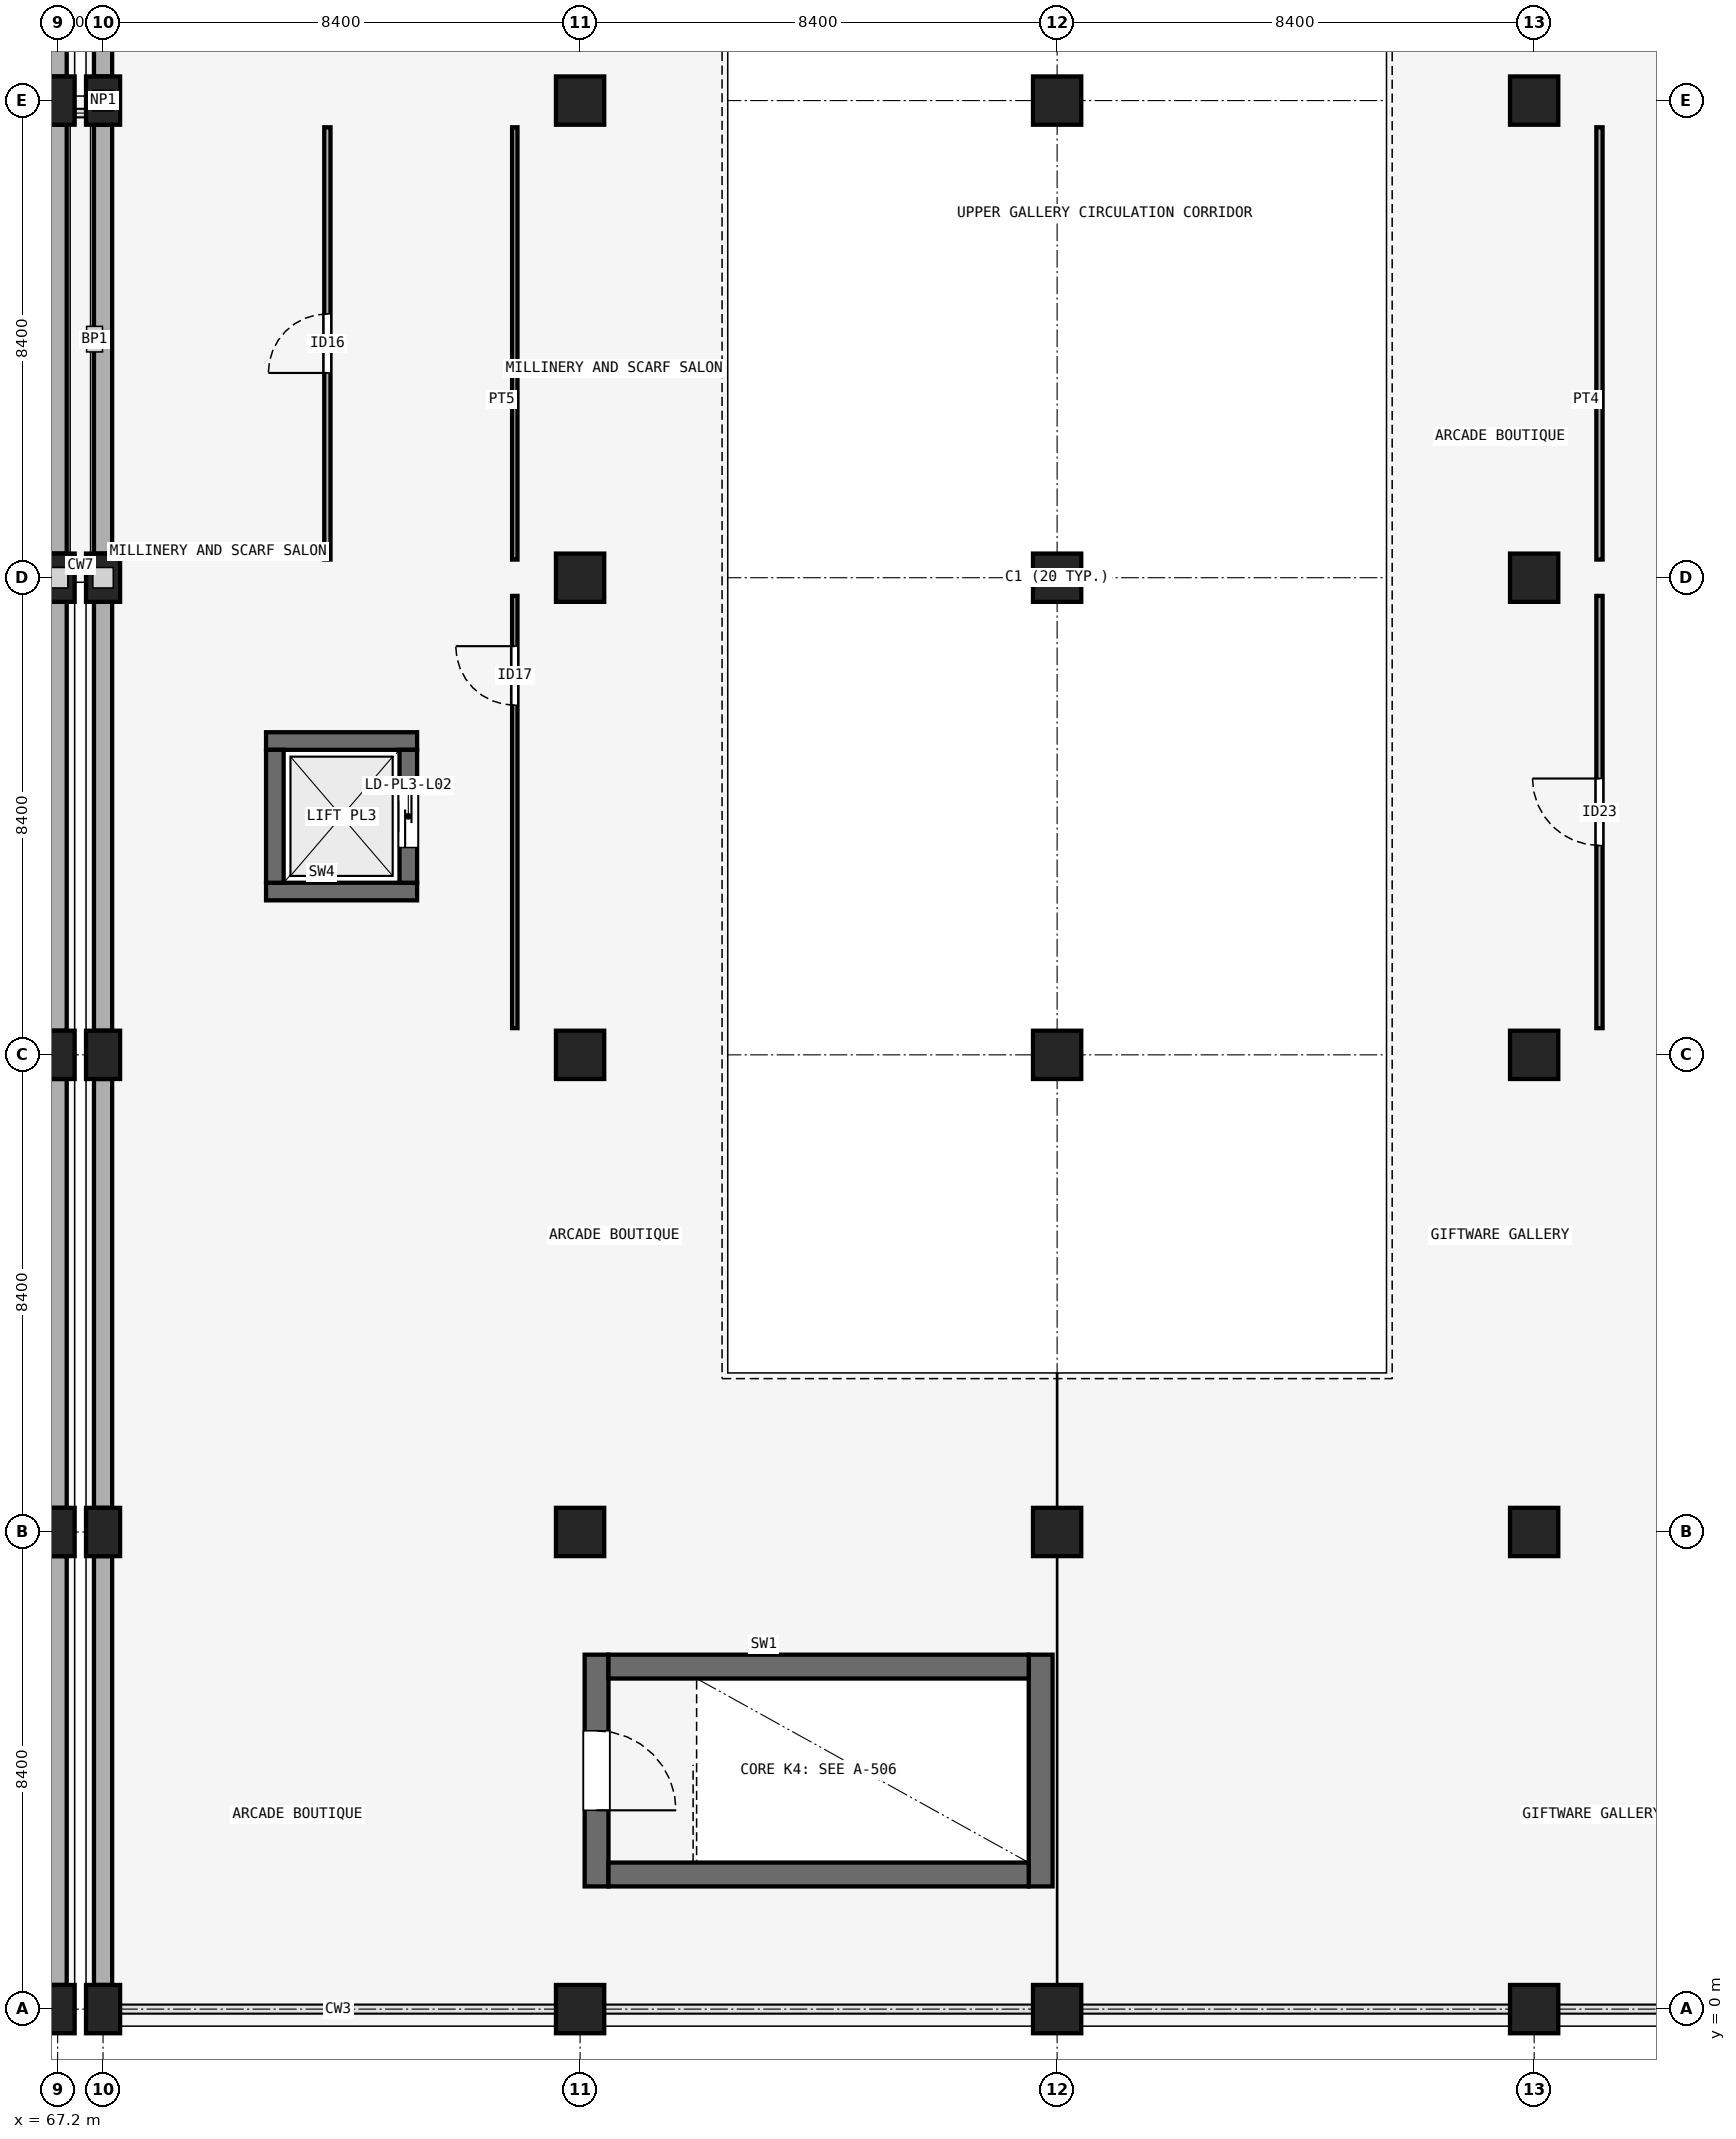
"""IFC4 building model, lengths in metres.
Left out: names, types, materials, properties, quantities, classifications, styles, units other than length and angle.
Written with IfcOpenShell. Run it as: python <this file> out.ifc"""

import sys

from ifc_helpers import new_model, si_unit, direction, frame, frame_2d, origin, origin_2d, place, context, subcontext, project, spatial, rectangle, extrude, element, fill, save


model = new_model("IFC4")
c1 = context("Model", 3, precision=1e-05, world=origin(), true_north=direction((0.0, 1.0)))
c2 = subcontext(c1, "Body", "Model", "MODEL_VIEW")
j1 = project(units=[si_unit("LENGTHUNIT", "METRE"), si_unit("PLANEANGLEUNIT", "RADIAN")], contexts=[c1])
p1 = place(None, origin())
s1 = spatial("IfcSite", under=j1, at=p1, CompositionType="ELEMENT")
p2 = place(p1, origin())
s2 = spatial("IfcBuilding", under=s1, at=p2, CompositionType="ELEMENT")
p3 = place(p2, frame((0.0, 0.0, 9.9)))
s3 = spatial("IfcBuildingStorey", under=s2, at=p3, CompositionType="ELEMENT", Elevation=9.9)
p4 = place(p3, frame((68.0, 0.0, 0.0), z_axis=(0.0, 0.0, 1.0), x_axis=(1.0, 0.0, 0.0)))
e1 = element("IfcColumn", 1, at=p4, inside=s3, PredefinedType="COLUMN", context=c2, shape_type="SweptSolid", body=[
    extrude(rectangle(XDim=0.6, YDim=0.85, at=origin_2d()), origin(), (0.0, 0.0, 1.0), 4.5),
])
for number, where, z_axis, x_axis in (
    (2, (76.4, 0.0, 0.0), (0.0, 0.0, 1.0), (1.0, 0.0, 0.0)),
    (3, (84.8, 0.0, 0.0), (0.0, 0.0, 1.0), (1.0, 0.0, 0.0)),
    (4, (93.2, 0.0, 0.0), (0.0, 0.0, 1.0), (1.0, 0.0, 0.0)),
):
    element("IfcColumn", number, at=place(p3, frame(where, z_axis=z_axis, x_axis=x_axis)), inside=s3, PredefinedType="COLUMN", context=c2, shape_type="SweptSolid", body=[
        extrude(rectangle(XDim=0.85, YDim=0.85, at=origin_2d()), origin(), (0.0, 0.0, 1.0), 4.5),
    ])
p5 = place(p3, frame((68.0, 8.4, 0.0), z_axis=(0.0, 0.0, 1.0), x_axis=(1.0, 0.0, 0.0)))
e5 = element("IfcColumn", 5, at=p5, inside=s3, PredefinedType="COLUMN", context=c2, shape_type="SweptSolid", body=[
    extrude(rectangle(XDim=0.6, YDim=0.85, at=origin_2d()), origin(), (0.0, 0.0, 1.0), 4.5),
])
for number, where, z_axis, x_axis in (
    (6, (76.4, 8.4, 0.0), (0.0, 0.0, 1.0), (1.0, 0.0, 0.0)),
    (7, (84.8, 8.4, 0.0), (0.0, 0.0, 1.0), (1.0, 0.0, 0.0)),
    (8, (93.2, 8.4, 0.0), (0.0, 0.0, 1.0), (1.0, 0.0, 0.0)),
):
    element("IfcColumn", number, at=place(p3, frame(where, z_axis=z_axis, x_axis=x_axis)), inside=s3, PredefinedType="COLUMN", context=c2, shape_type="SweptSolid", body=[
        extrude(rectangle(XDim=0.85, YDim=0.85, at=origin_2d()), origin(), (0.0, 0.0, 1.0), 4.5),
    ])
p6 = place(p3, frame((68.0, 16.8, 0.0), z_axis=(0.0, 0.0, 1.0), x_axis=(1.0, 0.0, 0.0)))
e9 = element("IfcColumn", 9, at=p6, inside=s3, PredefinedType="COLUMN", context=c2, shape_type="SweptSolid", body=[
    extrude(rectangle(XDim=0.6, YDim=0.85, at=origin_2d()), origin(), (0.0, 0.0, 1.0), 4.5),
])
for number, where, z_axis, x_axis in (
    (10, (76.4, 16.8, 0.0), (0.0, 0.0, 1.0), (1.0, 0.0, 0.0)),
    (11, (84.8, 16.8, 0.0), (0.0, 0.0, 1.0), (1.0, 0.0, 0.0)),
    (12, (93.2, 16.8, 0.0), (0.0, 0.0, 1.0), (1.0, 0.0, 0.0)),
):
    element("IfcColumn", number, at=place(p3, frame(where, z_axis=z_axis, x_axis=x_axis)), inside=s3, PredefinedType="COLUMN", context=c2, shape_type="SweptSolid", body=[
        extrude(rectangle(XDim=0.85, YDim=0.85, at=origin_2d()), origin(), (0.0, 0.0, 1.0), 4.5),
    ])
p7 = place(p3, frame((68.0, 25.2, 0.0), z_axis=(0.0, 0.0, 1.0), x_axis=(1.0, 0.0, 0.0)))
e13 = element("IfcColumn", 13, at=p7, inside=s3, PredefinedType="COLUMN", context=c2, shape_type="SweptSolid", body=[
    extrude(rectangle(XDim=0.6, YDim=0.85, at=origin_2d()), origin(), (0.0, 0.0, 1.0), 4.5),
])
for number, where, z_axis, x_axis in (
    (14, (76.4, 25.2, 0.0), (0.0, 0.0, 1.0), (1.0, 0.0, 0.0)),
    (15, (84.8, 25.2, 0.0), (0.0, 0.0, 1.0), (1.0, 0.0, 0.0)),
    (16, (93.2, 25.2, 0.0), (0.0, 0.0, 1.0), (1.0, 0.0, 0.0)),
):
    element("IfcColumn", number, at=place(p3, frame(where, z_axis=z_axis, x_axis=x_axis)), inside=s3, PredefinedType="COLUMN", context=c2, shape_type="SweptSolid", body=[
        extrude(rectangle(XDim=0.85, YDim=0.85, at=origin_2d()), origin(), (0.0, 0.0, 1.0), 4.5),
    ])
p8 = place(p3, frame((68.0, 33.6, 0.0), z_axis=(0.0, 0.0, 1.0), x_axis=(1.0, 0.0, 0.0)))
e17 = element("IfcColumn", 17, at=p8, inside=s3, PredefinedType="COLUMN", context=c2, shape_type="SweptSolid", body=[
    extrude(rectangle(XDim=0.6, YDim=0.85, at=origin_2d()), origin(), (0.0, 0.0, 1.0), 4.5),
])
for number, where, z_axis, x_axis in (
    (18, (76.4, 33.6, 0.0), (0.0, 0.0, 1.0), (1.0, 0.0, 0.0)),
    (19, (84.8, 33.6, 0.0), (0.0, 0.0, 1.0), (1.0, 0.0, 0.0)),
    (20, (93.2, 33.6, 0.0), (0.0, 0.0, 1.0), (1.0, 0.0, 0.0)),
):
    element("IfcColumn", number, at=place(p3, frame(where, z_axis=z_axis, x_axis=x_axis)), inside=s3, PredefinedType="COLUMN", context=c2, shape_type="SweptSolid", body=[
        extrude(rectangle(XDim=0.85, YDim=0.85, at=origin_2d()), origin(), (0.0, 0.0, 1.0), 4.5),
    ])
for number, where, z_axis, x_axis in (
    (21, (67.2, 0.0, 0.0), (0.0, 0.0, 1.0), (1.0, 0.0, 0.0)),
    (22, (67.2, 8.4, 0.0), (0.0, 0.0, 1.0), (1.0, 0.0, 0.0)),
    (23, (67.2, 16.8, 0.0), (0.0, 0.0, 1.0), (1.0, 0.0, 0.0)),
    (24, (67.2, 25.2, 0.0), (0.0, 0.0, 1.0), (1.0, 0.0, 0.0)),
    (25, (67.2, 33.6, 0.0), (0.0, 0.0, 1.0), (1.0, 0.0, 0.0)),
):
    element("IfcColumn", number, at=place(p3, frame(where, z_axis=z_axis, x_axis=x_axis)), inside=s3, PredefinedType="COLUMN", context=c2, shape_type="SweptSolid", body=[
        extrude(rectangle(XDim=0.6, YDim=0.85, at=origin_2d()), origin(), (0.0, 0.0, 1.0), 4.5),
    ])
for number, where, z_axis, x_axis in (
    (26, (68.0, 0.425, 0.0), (0.0, 0.0, 1.0), (0.0, 1.0, 0.0)),
    (27, (68.0, 8.825, 0.0), (0.0, 0.0, 1.0), (0.0, 1.0, 0.0)),
):
    element("IfcWall", number, at=place(p3, frame(where, z_axis=z_axis, x_axis=x_axis)), inside=s3, PredefinedType="SOLIDWALL", context=c2, shape_type="SweptSolid", body=[
        extrude(rectangle(XDim=7.55, YDim=0.32, at=frame_2d((3.775, 0.0))), origin(), (0.0, 0.0, 1.0), 3.49),
    ])
p9 = place(p3, frame((68.0, 17.225, 0.0), z_axis=(0.0, 0.0, 1.0), x_axis=(0.0, 1.0, 0.0)))
e28 = element("IfcWall", 28, at=p9, inside=s3, PredefinedType="SOLIDWALL", context=c2, shape_type="SweptSolid", body=[
    extrude(rectangle(XDim=7.55, YDim=0.32, at=frame_2d((3.775, 0.0))), origin(), (0.0, 0.0, 1.0), 3.49),
])
for number, where, z_axis, x_axis in (
    (29, (68.0, 25.625, 0.0), (0.0, 0.0, 1.0), (0.0, 1.0, 0.0)),
    (30, (68.0, 34.025, 0.0), (0.0, 0.0, 1.0), (0.0, 1.0, 0.0)),
    (31, (67.2, 0.425, 0.0), (0.0, 0.0, 1.0), (0.0, 1.0, 0.0)),
    (32, (67.2, 8.825, 0.0), (0.0, 0.0, 1.0), (0.0, 1.0, 0.0)),
):
    element("IfcWall", number, at=place(p3, frame(where, z_axis=z_axis, x_axis=x_axis)), inside=s3, PredefinedType="SOLIDWALL", context=c2, shape_type="SweptSolid", body=[
        extrude(rectangle(XDim=7.55, YDim=0.32, at=frame_2d((3.775, 0.0))), origin(), (0.0, 0.0, 1.0), 3.49),
    ])
p10 = place(p3, frame((67.2, 17.225, 0.0), z_axis=(0.0, 0.0, 1.0), x_axis=(0.0, 1.0, 0.0)))
e33 = element("IfcWall", 33, at=p10, inside=s3, PredefinedType="SOLIDWALL", context=c2, shape_type="SweptSolid", body=[
    extrude(rectangle(XDim=7.55, YDim=0.32, at=frame_2d((3.775, 0.0))), origin(), (0.0, 0.0, 1.0), 3.49),
])
for number, where, z_axis, x_axis in (
    (34, (67.2, 25.625, 0.0), (0.0, 0.0, 1.0), (0.0, 1.0, 0.0)),
    (35, (67.2, 34.025, 0.0), (0.0, 0.0, 1.0), (0.0, 1.0, 0.0)),
):
    element("IfcWall", number, at=place(p3, frame(where, z_axis=z_axis, x_axis=x_axis)), inside=s3, PredefinedType="SOLIDWALL", context=c2, shape_type="SweptSolid", body=[
        extrude(rectangle(XDim=7.55, YDim=0.32, at=frame_2d((3.775, 0.0))), origin(), (0.0, 0.0, 1.0), 3.49),
    ])
p11 = place(p3, frame((76.69, 6.24, 0.0), z_axis=(0.0, 0.0, 1.0), x_axis=(0.0, -1.0, 0.0)))
e36 = element("IfcWall", 36, at=p11, inside=s3, PredefinedType="SHEAR", context=c2, shape_type="SweptSolid", body=[
    extrude(rectangle(XDim=4.08, YDim=0.42, at=frame_2d((2.04, 0.0))), origin(), (0.0, 0.0, 1.0), 4.24),
])
p12 = place(p11, frame((1.34, 0.0, 0.0)))
e37 = element("IfcOpeningElement", 37, at=p12, cuts=e36, PredefinedType="OPENING", context=c2, shape_type="SweptSolid", body=[
    extrude(rectangle(XDim=1.4, YDim=2.15, at=frame_2d((0.7, 1.075))), frame((0.0, 0.22, 0.0), z_axis=(0.0, -1.0, 0.0), x_axis=(1.0, 0.0, 0.0)), (0.0, 0.0, 1.0), 0.44),
])
p13 = place(p3, frame((84.51, 2.16, 0.0), z_axis=(0.0, 0.0, 1.0), x_axis=(0.0, 1.0, 0.0)))
e38 = element("IfcWall", 38, at=p13, inside=s3, PredefinedType="SHEAR", context=c2, shape_type="SweptSolid", body=[
    extrude(rectangle(XDim=4.08, YDim=0.42, at=frame_2d((2.04, 0.0))), origin(), (0.0, 0.0, 1.0), 4.24),
])
for number, where, z_axis, x_axis in (
    (39, (76.9, 2.37, 0.0), (0.0, 0.0, 1.0), (1.0, 0.0, 0.0)),
    (40, (76.9, 6.03, 0.0), (0.0, 0.0, 1.0), (1.0, 0.0, 0.0)),
):
    element("IfcWall", number, at=place(p3, frame(where, z_axis=z_axis, x_axis=x_axis)), inside=s3, PredefinedType="SHEAR", context=c2, shape_type="SweptSolid", body=[
        extrude(rectangle(XDim=7.4, YDim=0.42, at=frame_2d((3.7, 0.0))), origin(), (0.0, 0.0, 1.0), 4.24),
    ])
for number, where, z_axis, x_axis in (
    (41, (70.87, 19.675, 0.0), (0.0, 0.0, 1.0), (1.0, 0.0, 0.0)),
    (42, (70.87, 22.325, 0.0), (0.0, 0.0, 1.0), (1.0, 0.0, 0.0)),
):
    element("IfcWall", number, at=place(p3, frame(where, z_axis=z_axis, x_axis=x_axis)), inside=s3, PredefinedType="SHEAR", context=c2, shape_type="SweptSolid", body=[
        extrude(rectangle(XDim=2.66, YDim=0.31, at=frame_2d((1.33, 0.0))), origin(), (0.0, 0.0, 1.0), 5.9),
    ])
p14 = place(p3, frame((71.025, 19.83, 0.0), z_axis=(0.0, 0.0, 1.0), x_axis=(0.0, 1.0, 0.0)))
e43 = element("IfcWall", 43, at=p14, inside=s3, PredefinedType="SHEAR", context=c2, shape_type="SweptSolid", body=[
    extrude(rectangle(XDim=2.34, YDim=0.31, at=frame_2d((1.17, 0.0))), origin(), (0.0, 0.0, 1.0), 5.9),
])
p15 = place(p3, frame((73.375, 19.83, 0.0), z_axis=(0.0, 0.0, 1.0), x_axis=(0.0, 1.0, 0.0)))
e44 = element("IfcWall", 44, at=p15, inside=s3, PredefinedType="SHEAR", context=c2, shape_type="SweptSolid", body=[
    extrude(rectangle(XDim=2.34, YDim=0.31, at=frame_2d((1.17, 0.0))), origin(), (0.0, 0.0, 1.0), 5.9),
])
p16 = place(p15, frame((0.62, 0.0, 0.0)))
e45 = element("IfcOpeningElement", 45, at=p16, cuts=e44, PredefinedType="OPENING", context=c2, shape_type="SweptSolid", body=[
    extrude(rectangle(XDim=1.1, YDim=2.2, at=frame_2d((0.55, 1.1))), frame((0.0, 0.165, 0.0), z_axis=(0.0, -1.0, 0.0), x_axis=(1.0, 0.0, 0.0)), (0.0, 0.0, 1.0), 0.33),
])
p17 = place(p3, frame((71.95, 25.52, 0.0), z_axis=(0.0, 0.0, 1.0), x_axis=(0.0, 1.0, 0.0)))
e46 = element("IfcWall", 46, at=p17, inside=s3, PredefinedType="PARTITIONING", context=c2, shape_type="SweptSolid", body=[
    extrude(rectangle(XDim=7.61, YDim=0.11, at=frame_2d((3.805, 0.0))), origin(), (0.0, 0.0, 1.0), 4.2),
])
p18 = place(p17, frame((3.285, 0.0, 0.0)))
e47 = element("IfcOpeningElement", 47, at=p18, cuts=e46, PredefinedType="OPENING", context=c2, shape_type="SweptSolid", body=[
    extrude(rectangle(XDim=1.04, YDim=2.22, at=frame_2d((0.52, 1.11))), frame((0.0, 0.065, 0.0), z_axis=(0.0, -1.0, 0.0), x_axis=(1.0, 0.0, 0.0)), (0.0, 0.0, 1.0), 0.13),
])
p19 = place(p3, frame((75.25, 17.27, 0.0), z_axis=(0.0, 0.0, 1.0), x_axis=(0.0, 1.0, 0.0)))
e48 = element("IfcWall", 48, at=p19, inside=s3, PredefinedType="PARTITIONING", context=c2, shape_type="SweptSolid", body=[
    extrude(rectangle(XDim=7.61, YDim=0.095, at=frame_2d((3.805, 0.0))), origin(), (0.0, 0.0, 1.0), 4.2),
])
p20 = place(p19, frame((5.685, 0.0, 0.0)))
e49 = element("IfcOpeningElement", 49, at=p20, cuts=e48, PredefinedType="OPENING", context=c2, shape_type="SweptSolid", body=[
    extrude(rectangle(XDim=1.04, YDim=2.34, at=frame_2d((0.52, 1.17))), frame((0.0, 0.057, 0.0), z_axis=(0.0, -1.0, 0.0), x_axis=(1.0, 0.0, 0.0)), (0.0, 0.0, 1.0), 0.115),
])
p21 = place(p3, frame((75.25, 25.52, 0.0), z_axis=(0.0, 0.0, 1.0), x_axis=(0.0, 1.0, 0.0)))
e50 = element("IfcWall", 50, at=p21, inside=s3, PredefinedType="PARTITIONING", context=c2, shape_type="SweptSolid", body=[
    extrude(rectangle(XDim=7.61, YDim=0.095, at=frame_2d((3.805, 0.0))), origin(), (0.0, 0.0, 1.0), 4.2),
])
p22 = place(p3, frame((94.35, 17.27, 0.0), z_axis=(0.0, 0.0, 1.0), x_axis=(0.0, 1.0, 0.0)))
e51 = element("IfcWall", 51, at=p22, inside=s3, PredefinedType="PARTITIONING", context=c2, shape_type="SweptSolid", body=[
    extrude(rectangle(XDim=7.61, YDim=0.11, at=frame_2d((3.805, 0.0))), origin(), (0.0, 0.0, 1.0), 4.2),
])
p23 = place(p22, frame((3.215, 0.0, 0.0)))
e52 = element("IfcOpeningElement", 52, at=p23, cuts=e51, PredefinedType="OPENING", context=c2, shape_type="SweptSolid", body=[
    extrude(rectangle(XDim=1.18, YDim=2.1, at=frame_2d((0.59, 1.05))), frame((0.0, 0.065, 0.0), z_axis=(0.0, -1.0, 0.0), x_axis=(1.0, 0.0, 0.0)), (0.0, 0.0, 1.0), 0.13),
])
p24 = place(p3, frame((94.35, 25.52, 0.0), z_axis=(0.0, 0.0, 1.0), x_axis=(0.0, 1.0, 0.0)))
e53 = element("IfcWall", 53, at=p24, inside=s3, PredefinedType="PARTITIONING", context=c2, shape_type="SweptSolid", body=[
    extrude(rectangle(XDim=7.61, YDim=0.11, at=frame_2d((3.805, 0.0))), origin(), (0.0, 0.0, 1.0), 4.2),
])
p25 = place(p12, origin())
e54 = element("IfcDoor", 54, at=p25, inside=s3, OperationType="SINGLE_SWING_RIGHT", PredefinedType="DOOR", context=c2, shape_type="SweptSolid", body=[
    extrude(rectangle(XDim=1.4, YDim=2.15, at=frame_2d((0.7, 1.075))), frame((0.0, 0.025, 0.0), z_axis=(0.0, -1.0, 0.0), x_axis=(1.0, 0.0, 0.0)), (0.0, 0.0, 1.0), 0.05),
])
fill(e37, e54)
p26 = place(p16, origin())
e55 = element("IfcDoor", 55, at=p26, inside=s3, OperationType="SLIDING_TO_LEFT", PredefinedType="DOOR", context=c2, shape_type="SweptSolid", body=[
    extrude(rectangle(XDim=1.1, YDim=2.2, at=frame_2d((0.55, 1.1))), frame((0.0, 0.025, 0.0), z_axis=(0.0, -1.0, 0.0), x_axis=(1.0, 0.0, 0.0)), (0.0, 0.0, 1.0), 0.05),
])
fill(e45, e55)
p27 = place(p18, origin())
e56 = element("IfcDoor", 56, at=p27, inside=s3, OperationType="SINGLE_SWING_LEFT", PredefinedType="DOOR", context=c2, shape_type="SweptSolid", body=[
    extrude(rectangle(XDim=1.04, YDim=2.22, at=frame_2d((0.52, 1.11))), frame((0.0, 0.025, 0.0), z_axis=(0.0, -1.0, 0.0), x_axis=(1.0, 0.0, 0.0)), (0.0, 0.0, 1.0), 0.05),
])
fill(e47, e56)
p28 = place(p20, origin())
e57 = element("IfcDoor", 57, at=p28, inside=s3, OperationType="SINGLE_SWING_RIGHT", PredefinedType="DOOR", context=c2, shape_type="SweptSolid", body=[
    extrude(rectangle(XDim=1.04, YDim=2.34, at=frame_2d((0.52, 1.17))), frame((0.0, 0.025, 0.0), z_axis=(0.0, -1.0, 0.0), x_axis=(1.0, 0.0, 0.0)), (0.0, 0.0, 1.0), 0.05),
])
fill(e49, e57)
p29 = place(p23, origin())
e58 = element("IfcDoor", 58, at=p29, inside=s3, OperationType="SINGLE_SWING_RIGHT", PredefinedType="DOOR", context=c2, shape_type="SweptSolid", body=[
    extrude(rectangle(XDim=1.18, YDim=2.1, at=frame_2d((0.59, 1.05))), frame((0.0, 0.025, 0.0), z_axis=(0.0, -1.0, 0.0), x_axis=(1.0, 0.0, 0.0)), (0.0, 0.0, 1.0), 0.05),
])
fill(e52, e58)
save(model, sys.argv[1])
